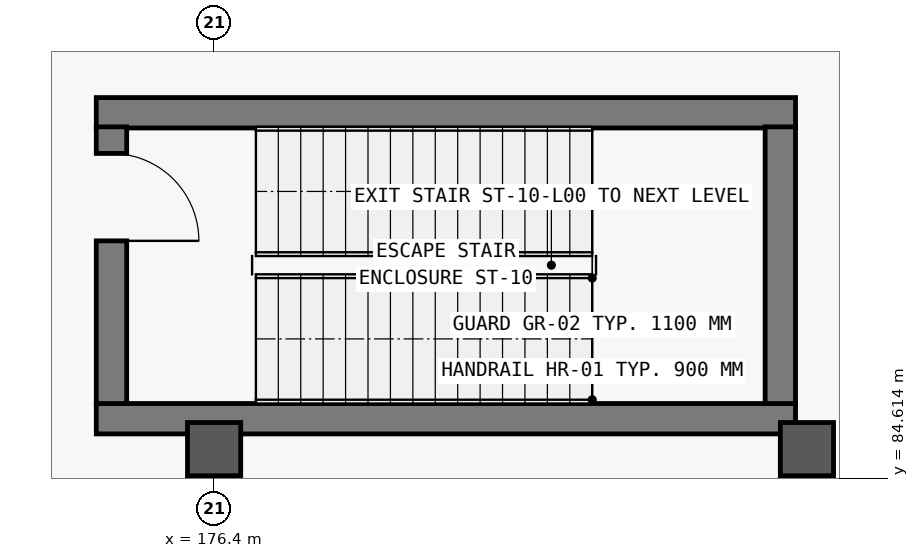
"""IFC4 building model, lengths in metres.
Left out: names, types, materials, properties, quantities, classifications, styles, units other than length and angle.
Written with IfcOpenShell. Run it as: python <this file> out.ifc"""

import sys

from ifc_helpers import new_model, si_unit, direction, frame, frame_2d, origin, origin_2d, place, context, subcontext, project, spatial, rectangle, extrude, element, fill, save


model = new_model("IFC4")
c1 = context("Model", 3, precision=1e-05, world=origin(), true_north=direction((0.0, 1.0)))
c2 = subcontext(c1, "Body", "Model", "MODEL_VIEW")
j1 = project(units=[si_unit("LENGTHUNIT", "METRE"), si_unit("PLANEANGLEUNIT", "RADIAN")], contexts=[c1])
p1 = place(None, origin())
s1 = spatial("IfcSite", under=j1, at=p1, CompositionType="ELEMENT")
p2 = place(p1, origin())
s2 = spatial("IfcBuilding", under=s1, at=p2, CompositionType="ELEMENT")
p3 = place(p2, origin())
s3 = spatial("IfcBuildingStorey", under=s2, at=p3, CompositionType="ELEMENT", Elevation=0.0)
for number, where, z_axis, x_axis in (
    (1, (176.4, 85.0, 0.0), (0.0, 0.0, 1.0), (1.0, 0.0, 0.0)),
    (2, (184.2, 85.0, 0.0), (0.0, 0.0, 1.0), (1.0, 0.0, 0.0)),
):
    element("IfcColumn", number, at=place(p3, frame(where, z_axis=z_axis, x_axis=x_axis)), inside=s3, PredefinedType="COLUMN", context=c2, shape_type="SweptSolid", body=[
        extrude(rectangle(XDim=0.7, YDim=0.7, at=origin_2d()), origin(), (0.0, 0.0, 1.0), 5.4),
    ])
for number, where, z_axis, x_axis in (
    (3, (174.85, 85.4, 0.0), (0.0, 0.0, 1.0), (1.0, 0.0, 0.0)),
    (4, (184.05, 89.425, 0.0), (0.0, 0.0, 1.0), (-1.0, 0.0, 0.0)),
):
    element("IfcWall", number, at=place(p3, frame(where, z_axis=z_axis, x_axis=x_axis)), inside=s3, PredefinedType="SHEAR", context=c2, shape_type="SweptSolid", body=[
        extrude(rectangle(XDim=9.2, YDim=0.4, at=frame_2d((4.6, 0.0))), origin(), (0.0, 0.0, 1.0), 5.08),
    ])
p4 = place(p3, frame((175.05, 89.24, 0.0), z_axis=(0.0, 0.0, 1.0), x_axis=(0.0, -1.0, 0.0)))
e5 = element("IfcWall", 5, at=p4, inside=s3, PredefinedType="SHEAR", context=c2, shape_type="SweptSolid", body=[
    extrude(rectangle(XDim=3.64, YDim=0.4, at=frame_2d((1.82, 0.0))), origin(), (0.0, 0.0, 1.0), 5.08),
])
p5 = place(p4, frame((0.35, 0.0, 0.0)))
e6 = element("IfcOpeningElement", 6, at=p5, cuts=e5, PredefinedType="OPENING", context=c2, shape_type="SweptSolid", body=[
    extrude(rectangle(XDim=1.15, YDim=2.2, at=frame_2d((0.575, 1.1))), frame((0.0, 0.21, 0.0), z_axis=(0.0, -1.0, 0.0), x_axis=(1.0, 0.0, 0.0)), (0.0, 0.0, 1.0), 0.42),
])
p6 = place(p3, frame((183.85, 85.6, 0.0), z_axis=(0.0, 0.0, 1.0), x_axis=(0.0, 1.0, 0.0)))
e7 = element("IfcWall", 7, at=p6, inside=s3, PredefinedType="SHEAR", context=c2, shape_type="SweptSolid", body=[
    extrude(rectangle(XDim=3.64, YDim=0.4, at=frame_2d((1.82, 0.0))), origin(), (0.0, 0.0, 1.0), 5.08),
])
p7 = place(p5, origin())
e8 = element("IfcDoor", 8, at=p7, inside=s3, OperationType="SINGLE_SWING_RIGHT", PredefinedType="DOOR", context=c2, shape_type="SweptSolid", body=[
    extrude(rectangle(XDim=1.15, YDim=2.2, at=frame_2d((0.575, 1.1))), frame((0.0, 0.025, 0.0), z_axis=(0.0, -1.0, 0.0), x_axis=(1.0, 0.0, 0.0)), (0.0, 0.0, 1.0), 0.05),
])
fill(e6, e8)
save(model, sys.argv[1])
